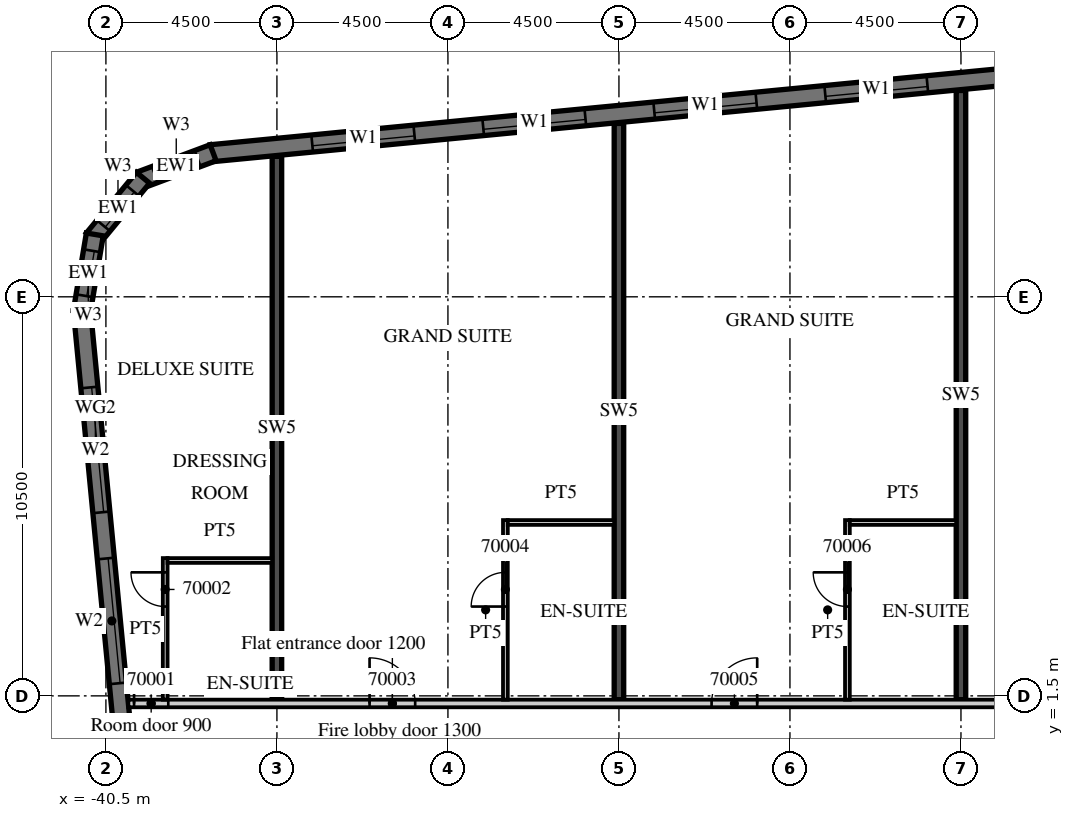
"""IFC4 building model, lengths in metres.
Left out: names, types, materials, properties, quantities, classifications, styles, units other than length and angle.
Written with IfcOpenShell. Run it as: python <this file> out.ifc"""

import sys

from ifc_helpers import new_model, si_unit, direction, frame, frame_2d, origin, place, context, subcontext, project, spatial, polyline, rectangle, outline, extrude, element, fill, save


model = new_model("IFC4")
c1 = context("Model", 3, precision=1e-05, world=origin(), true_north=direction((0.0, 1.0)))
c2 = subcontext(c1, "Body", "Model", "MODEL_VIEW")
j1 = project(units=[si_unit("LENGTHUNIT", "METRE"), si_unit("PLANEANGLEUNIT", "RADIAN")], contexts=[c1])
p1 = place(None, origin())
s1 = spatial("IfcSite", under=j1, at=p1, CompositionType="ELEMENT")
p2 = place(p1, origin())
s2 = spatial("IfcBuilding", under=s1, at=p2, CompositionType="ELEMENT")
p3 = place(p2, frame((0.0, 0.0, 281.7)))
s3 = spatial("IfcBuildingStorey", under=s2, at=p3, CompositionType="ELEMENT", Elevation=281.7)
p4 = place(p3, frame((-36.0, 1.4, 0.0), z_axis=(0.0, 0.0, 1.0), x_axis=(0.0, 1.0, 0.0)))
e1 = element("IfcWall", 1, at=p4, inside=s3, PredefinedType="SHEAR", context=c2, shape_type="SweptSolid", body=[
    extrude(rectangle(XDim=14.296, YDim=0.25, at=frame_2d((7.148, 0.0))), origin(), (0.0, 0.0, 1.0), 3.3),
])
p5 = place(p3, frame((-27.0, 1.4, 0.0), z_axis=(0.0, 0.0, 1.0), x_axis=(0.0, 1.0, 0.0)))
e2 = element("IfcWall", 2, at=p5, inside=s3, PredefinedType="SHEAR", context=c2, shape_type="SweptSolid", body=[
    extrude(rectangle(XDim=15.163, YDim=0.25, at=frame_2d((7.582, 0.0))), origin(), (0.0, 0.0, 1.0), 3.3),
])
p6 = place(p3, frame((-18.0, 1.4, 0.0), z_axis=(0.0, 0.0, 1.0), x_axis=(0.0, 1.0, 0.0)))
e3 = element("IfcWall", 3, at=p6, inside=s3, PredefinedType="SHEAR", context=c2, shape_type="SweptSolid", body=[
    extrude(rectangle(XDim=16.03, YDim=0.25, at=frame_2d((8.015, 0.0))), origin(), (0.0, 0.0, 1.0), 3.3),
])
p7 = place(p3, frame((-41.132, 11.658, 0.0), z_axis=(0.0, 0.0, 1.0), x_axis=(0.095847749461, -0.995396006082, 0.0)))
e4 = element("IfcWall", 4, at=p7, inside=s3, PredefinedType="SOLIDWALL", context=c2, shape_type="SweptSolid", body=[
    extrude(rectangle(XDim=32.0, YDim=0.45, at=frame_2d((16.0, 0.0))), origin(), (0.0, 0.0, 1.0), 3.02),
])
p8 = place(p7, frame((2.053, 0.0, 0.45)))
e5 = element("IfcOpeningElement", 5, at=p8, cuts=e4, PredefinedType="OPENING", context=c2, shape_type="SweptSolid", body=[
    extrude(rectangle(XDim=3.3, YDim=2.25, at=frame_2d((1.65, 1.125))), frame((0.0, 0.235, 0.0), z_axis=(0.0, -1.0, 0.0), x_axis=(1.0, 0.0, 0.0)), (0.0, 0.0, 1.0), 0.47),
])
p9 = place(p7, frame((6.574, 0.0, 0.45)))
e6 = element("IfcOpeningElement", 6, at=p9, cuts=e4, PredefinedType="OPENING", context=c2, shape_type="SweptSolid", body=[
    extrude(rectangle(XDim=3.3, YDim=2.25, at=frame_2d((1.65, 1.125))), frame((0.0, 0.235, 0.0), z_axis=(0.0, -1.0, 0.0), x_axis=(1.0, 0.0, 0.0)), (0.0, 0.0, 1.0), 0.47),
])
p10 = place(p3, frame((13.521, 20.713, 0.0), z_axis=(0.0, 0.0, 1.0), x_axis=(-0.995396277313, -0.095844932638, 0.0)))
e7 = element("IfcWall", 7, at=p10, inside=s3, PredefinedType="SOLIDWALL", context=c2, shape_type="SweptSolid", body=[
    extrude(rectangle(XDim=51.495, YDim=0.45, at=frame_2d((25.748, 0.0))), origin(), (0.0, 0.0, 1.0), 3.02),
])
p11 = place(p10, frame((0.91, 0.0, 0.45)))
e8 = element("IfcOpeningElement", 8, at=p11, cuts=e7, PredefinedType="OPENING", context=c2, shape_type="SweptSolid", body=[
    extrude(rectangle(XDim=2.7, YDim=2.25, at=frame_2d((1.35, 1.125))), frame((0.0, 0.235, 0.0), z_axis=(0.0, -1.0, 0.0), x_axis=(1.0, 0.0, 0.0)), (0.0, 0.0, 1.0), 0.47),
])
p12 = place(p10, frame((5.431, 0.0, 0.45)))
e9 = element("IfcOpeningElement", 9, at=p12, cuts=e7, PredefinedType="OPENING", context=c2, shape_type="SweptSolid", body=[
    extrude(rectangle(XDim=2.7, YDim=2.25, at=frame_2d((1.35, 1.125))), frame((0.0, 0.235, 0.0), z_axis=(0.0, -1.0, 0.0), x_axis=(1.0, 0.0, 0.0)), (0.0, 0.0, 1.0), 0.47),
])
p13 = place(p10, frame((9.952, 0.0, 0.45)))
e10 = element("IfcOpeningElement", 10, at=p13, cuts=e7, PredefinedType="OPENING", context=c2, shape_type="SweptSolid", body=[
    extrude(rectangle(XDim=2.7, YDim=2.25, at=frame_2d((1.35, 1.125))), frame((0.0, 0.235, 0.0), z_axis=(0.0, -1.0, 0.0), x_axis=(1.0, 0.0, 0.0)), (0.0, 0.0, 1.0), 0.47),
])
p14 = place(p10, frame((14.473, 0.0, 0.45)))
e11 = element("IfcOpeningElement", 11, at=p14, cuts=e7, PredefinedType="OPENING", context=c2, shape_type="SweptSolid", body=[
    extrude(rectangle(XDim=2.7, YDim=2.25, at=frame_2d((1.35, 1.125))), frame((0.0, 0.235, 0.0), z_axis=(0.0, -1.0, 0.0), x_axis=(1.0, 0.0, 0.0)), (0.0, 0.0, 1.0), 0.47),
])
p15 = place(p10, frame((18.994, 0.0, 0.45)))
e12 = element("IfcOpeningElement", 12, at=p15, cuts=e7, PredefinedType="OPENING", context=c2, shape_type="SweptSolid", body=[
    extrude(rectangle(XDim=2.7, YDim=2.25, at=frame_2d((1.35, 1.125))), frame((0.0, 0.235, 0.0), z_axis=(0.0, -1.0, 0.0), x_axis=(1.0, 0.0, 0.0)), (0.0, 0.0, 1.0), 0.47),
])
p16 = place(p10, frame((23.514, 0.0, 0.45)))
e13 = element("IfcOpeningElement", 13, at=p16, cuts=e7, PredefinedType="OPENING", context=c2, shape_type="SweptSolid", body=[
    extrude(rectangle(XDim=2.7, YDim=2.25, at=frame_2d((1.35, 1.125))), frame((0.0, 0.235, 0.0), z_axis=(0.0, -1.0, 0.0), x_axis=(1.0, 0.0, 0.0)), (0.0, 0.0, 1.0), 0.47),
])
p17 = place(p10, frame((28.035, 0.0, 0.45)))
e14 = element("IfcOpeningElement", 14, at=p17, cuts=e7, PredefinedType="OPENING", context=c2, shape_type="SweptSolid", body=[
    extrude(rectangle(XDim=2.7, YDim=2.25, at=frame_2d((1.35, 1.125))), frame((0.0, 0.235, 0.0), z_axis=(0.0, -1.0, 0.0), x_axis=(1.0, 0.0, 0.0)), (0.0, 0.0, 1.0), 0.47),
])
p18 = place(p10, frame((32.556, 0.0, 0.45)))
e15 = element("IfcOpeningElement", 15, at=p18, cuts=e7, PredefinedType="OPENING", context=c2, shape_type="SweptSolid", body=[
    extrude(rectangle(XDim=2.7, YDim=2.25, at=frame_2d((1.35, 1.125))), frame((0.0, 0.235, 0.0), z_axis=(0.0, -1.0, 0.0), x_axis=(1.0, 0.0, 0.0)), (0.0, 0.0, 1.0), 0.47),
])
p19 = place(p10, frame((37.077, 0.0, 0.45)))
e16 = element("IfcOpeningElement", 16, at=p19, cuts=e7, PredefinedType="OPENING", context=c2, shape_type="SweptSolid", body=[
    extrude(rectangle(XDim=2.7, YDim=2.25, at=frame_2d((1.35, 1.125))), frame((0.0, 0.235, 0.0), z_axis=(0.0, -1.0, 0.0), x_axis=(1.0, 0.0, 0.0)), (0.0, 0.0, 1.0), 0.47),
])
p20 = place(p10, frame((41.598, 0.0, 0.45)))
e17 = element("IfcOpeningElement", 17, at=p20, cuts=e7, PredefinedType="OPENING", context=c2, shape_type="SweptSolid", body=[
    extrude(rectangle(XDim=2.7, YDim=2.25, at=frame_2d((1.35, 1.125))), frame((0.0, 0.235, 0.0), z_axis=(0.0, -1.0, 0.0), x_axis=(1.0, 0.0, 0.0)), (0.0, 0.0, 1.0), 0.47),
])
p21 = place(p10, frame((46.118, 0.0, 0.45)))
e18 = element("IfcOpeningElement", 18, at=p21, cuts=e7, PredefinedType="OPENING", context=c2, shape_type="SweptSolid", body=[
    extrude(rectangle(XDim=2.7, YDim=2.25, at=frame_2d((1.35, 1.125))), frame((0.0, 0.235, 0.0), z_axis=(0.0, -1.0, 0.0), x_axis=(1.0, 0.0, 0.0)), (0.0, 0.0, 1.0), 0.47),
])
p22 = place(p3, frame((-37.679, 15.791, 0.0), z_axis=(0.0, 0.0, 1.0), x_axis=(-0.936677599948, -0.350192909346, 0.0)))
e19 = element("IfcWall", 19, at=p22, inside=s3, PredefinedType="SOLIDWALL", context=c2, shape_type="SweptSolid", body=[
    extrude(outline(polyline([(0.0, -0.225), (2.071, -0.225), (1.95, 0.225), (0.121, 0.225), (0.0, -0.225)])), origin(), (0.0, 0.0, 1.0), 3.02),
])
p23 = place(p22, frame((0.435, 0.0, 0.45)))
e20 = element("IfcOpeningElement", 20, at=p23, cuts=e19, PredefinedType="OPENING", context=c2, shape_type="SweptSolid", body=[
    extrude(rectangle(XDim=1.2, YDim=2.25, at=frame_2d((0.6, 1.125))), frame((0.0, 0.235, 0.0), z_axis=(0.0, -1.0, 0.0), x_axis=(1.0, 0.0, 0.0)), (0.0, 0.0, 1.0), 0.47),
])
p24 = place(p3, frame((-39.524, 15.133, 0.0), z_axis=(0.0, 0.0, 1.0), x_axis=(-0.636046112757, -0.771651049663, 0.0)))
e21 = element("IfcWall", 21, at=p24, inside=s3, PredefinedType="SOLIDWALL", context=c2, shape_type="SweptSolid", body=[
    extrude(outline(polyline([(0.0, -0.225), (2.071, -0.225), (1.95, 0.225), (0.121, 0.225), (0.0, -0.225)])), origin(), (0.0, 0.0, 1.0), 3.02),
])
p25 = place(p24, frame((0.435, 0.0, 0.45)))
e22 = element("IfcOpeningElement", 22, at=p25, cuts=e21, PredefinedType="OPENING", context=c2, shape_type="SweptSolid", body=[
    extrude(rectangle(XDim=1.2, YDim=2.25, at=frame_2d((0.6, 1.125))), frame((0.0, 0.235, 0.0), z_axis=(0.0, -1.0, 0.0), x_axis=(1.0, 0.0, 0.0)), (0.0, 0.0, 1.0), 0.47),
])
p26 = place(p3, frame((-40.792, 13.641, 0.0), z_axis=(0.0, 0.0, 1.0), x_axis=(-0.165068144653, -0.986282164302, 0.0)))
e23 = element("IfcWall", 23, at=p26, inside=s3, PredefinedType="SOLIDWALL", context=c2, shape_type="SweptSolid", body=[
    extrude(outline(polyline([(0.0, -0.225), (2.071, -0.225), (1.95, 0.225), (0.121, 0.225), (0.0, -0.225)])), origin(), (0.0, 0.0, 1.0), 3.02),
])
p27 = place(p26, frame((0.435, 0.0, 0.45)))
e24 = element("IfcOpeningElement", 24, at=p27, cuts=e23, PredefinedType="OPENING", context=c2, shape_type="SweptSolid", body=[
    extrude(rectangle(XDim=1.2, YDim=2.25, at=frame_2d((0.6, 1.125))), frame((0.0, 0.235, 0.0), z_axis=(0.0, -1.0, 0.0), x_axis=(1.0, 0.0, 0.0)), (0.0, 0.0, 1.0), 0.47),
])
p28 = place(p3, frame((-39.909, 1.3, 0.0), z_axis=(0.0, 0.0, 1.0), x_axis=(1.0, 0.0, 0.0)))
e25 = element("IfcWall", 25, at=p28, inside=s3, PredefinedType="PARTITIONING", context=c2, shape_type="SweptSolid", body=[
    extrude(rectangle(XDim=53.409, YDim=0.2, at=frame_2d((26.705, 0.0))), origin(), (0.0, 0.0, 1.0), 3.02),
])
p29 = place(p28, frame((0.15, 0.0, 0.0)))
e26 = element("IfcOpeningElement", 26, at=p29, cuts=e25, PredefinedType="OPENING", context=c2, shape_type="SweptSolid", body=[
    extrude(rectangle(XDim=0.9, YDim=2.1, at=frame_2d((0.45, 1.05))), frame((0.0, 0.11, 0.0), z_axis=(0.0, -1.0, 0.0), x_axis=(1.0, 0.0, 0.0)), (0.0, 0.0, 1.0), 0.22),
])
p30 = place(p28, frame((6.347, 0.0, 0.0)))
e27 = element("IfcOpeningElement", 27, at=p30, cuts=e25, PredefinedType="OPENING", context=c2, shape_type="SweptSolid", body=[
    extrude(rectangle(XDim=1.2, YDim=2.1, at=frame_2d((0.6, 1.05))), frame((0.0, 0.11, 0.0), z_axis=(0.0, -1.0, 0.0), x_axis=(1.0, 0.0, 0.0)), (0.0, 0.0, 1.0), 0.22),
])
p31 = place(p28, frame((15.347, 0.0, 0.0)))
e28 = element("IfcOpeningElement", 28, at=p31, cuts=e25, PredefinedType="OPENING", context=c2, shape_type="SweptSolid", body=[
    extrude(rectangle(XDim=1.2, YDim=2.1, at=frame_2d((0.6, 1.05))), frame((0.0, 0.11, 0.0), z_axis=(0.0, -1.0, 0.0), x_axis=(1.0, 0.0, 0.0)), (0.0, 0.0, 1.0), 0.22),
])
p32 = place(p28, frame((24.346, 0.0, 0.0)))
e29 = element("IfcOpeningElement", 29, at=p32, cuts=e25, PredefinedType="OPENING", context=c2, shape_type="SweptSolid", body=[
    extrude(rectangle(XDim=1.2, YDim=2.1, at=frame_2d((0.6, 1.05))), frame((0.0, 0.11, 0.0), z_axis=(0.0, -1.0, 0.0), x_axis=(1.0, 0.0, 0.0)), (0.0, 0.0, 1.0), 0.22),
])
p33 = place(p28, frame((33.346, 0.0, 0.0)))
e30 = element("IfcOpeningElement", 30, at=p33, cuts=e25, PredefinedType="OPENING", context=c2, shape_type="SweptSolid", body=[
    extrude(rectangle(XDim=1.2, YDim=2.1, at=frame_2d((0.6, 1.05))), frame((0.0, 0.11, 0.0), z_axis=(0.0, -1.0, 0.0), x_axis=(1.0, 0.0, 0.0)), (0.0, 0.0, 1.0), 0.22),
])
p34 = place(p28, frame((42.346, 0.0, 0.0)))
e31 = element("IfcOpeningElement", 31, at=p34, cuts=e25, PredefinedType="OPENING", context=c2, shape_type="SweptSolid", body=[
    extrude(rectangle(XDim=1.2, YDim=2.1, at=frame_2d((0.6, 1.05))), frame((0.0, 0.11, 0.0), z_axis=(0.0, -1.0, 0.0), x_axis=(1.0, 0.0, 0.0)), (0.0, 0.0, 1.0), 0.22),
])
p35 = place(p28, frame((51.834, 0.0, 0.0)))
e32 = element("IfcOpeningElement", 32, at=p35, cuts=e25, PredefinedType="OPENING", context=c2, shape_type="SweptSolid", body=[
    extrude(rectangle(XDim=1.0, YDim=2.1, at=frame_2d((0.5, 1.05))), frame((0.0, 0.11, 0.0), z_axis=(0.0, -1.0, 0.0), x_axis=(1.0, 0.0, 0.0)), (0.0, 0.0, 1.0), 0.22),
])
p36 = place(p3, frame((-38.94, 1.4, 0.0), z_axis=(0.0, 0.0, 1.0), x_axis=(0.0, 1.0, 0.0)))
e33 = element("IfcWall", 33, at=p36, inside=s3, PredefinedType="PARTITIONING", context=c2, shape_type="SweptSolid", body=[
    extrude(rectangle(XDim=3.725, YDim=0.125, at=frame_2d((1.863, 0.0))), origin(), (0.0, 0.0, 1.0), 3.02),
])
p37 = place(p36, frame((2.45, 0.0, 0.0)))
e34 = element("IfcOpeningElement", 34, at=p37, cuts=e33, PredefinedType="OPENING", context=c2, shape_type="SweptSolid", body=[
    extrude(rectangle(XDim=0.9, YDim=2.1, at=frame_2d((0.45, 1.05))), frame((0.0, 0.073, 0.0), z_axis=(0.0, -1.0, 0.0), x_axis=(1.0, 0.0, 0.0)), (0.0, 0.0, 1.0), 0.145),
])
p38 = place(p3, frame((-38.878, 5.062, 0.0), z_axis=(0.0, 0.0, 1.0), x_axis=(1.0, 0.0, 0.0)))
e35 = element("IfcWall", 35, at=p38, inside=s3, PredefinedType="PARTITIONING", context=c2, shape_type="SweptSolid", body=[
    extrude(rectangle(XDim=2.753, YDim=0.125, at=frame_2d((1.376, 0.0))), origin(), (0.0, 0.0, 1.0), 3.02),
])
p39 = place(p3, frame((-29.988, 1.4, 0.0), z_axis=(0.0, 0.0, 1.0), x_axis=(0.0, 1.0, 0.0)))
e36 = element("IfcWall", 36, at=p39, inside=s3, PredefinedType="PARTITIONING", context=c2, shape_type="SweptSolid", body=[
    extrude(rectangle(XDim=4.725, YDim=0.125, at=frame_2d((2.363, 0.0))), origin(), (0.0, 0.0, 1.0), 3.02),
])
p40 = place(p39, frame((2.45, 0.0, 0.0)))
e37 = element("IfcOpeningElement", 37, at=p40, cuts=e36, PredefinedType="OPENING", context=c2, shape_type="SweptSolid", body=[
    extrude(rectangle(XDim=0.9, YDim=2.1, at=frame_2d((0.45, 1.05))), frame((0.0, 0.073, 0.0), z_axis=(0.0, -1.0, 0.0), x_axis=(1.0, 0.0, 0.0)), (0.0, 0.0, 1.0), 0.145),
])
p41 = place(p3, frame((-29.925, 6.062, 0.0), z_axis=(0.0, 0.0, 1.0), x_axis=(1.0, 0.0, 0.0)))
e38 = element("IfcWall", 38, at=p41, inside=s3, PredefinedType="PARTITIONING", context=c2, shape_type="SweptSolid", body=[
    extrude(rectangle(XDim=2.8, YDim=0.125, at=frame_2d((1.4, 0.0))), origin(), (0.0, 0.0, 1.0), 3.02),
])
p42 = place(p3, frame((-20.988, 1.4, 0.0), z_axis=(0.0, 0.0, 1.0), x_axis=(0.0, 1.0, 0.0)))
e39 = element("IfcWall", 39, at=p42, inside=s3, PredefinedType="PARTITIONING", context=c2, shape_type="SweptSolid", body=[
    extrude(rectangle(XDim=4.725, YDim=0.125, at=frame_2d((2.363, 0.0))), origin(), (0.0, 0.0, 1.0), 3.02),
])
p43 = place(p42, frame((2.45, 0.0, 0.0)))
e40 = element("IfcOpeningElement", 40, at=p43, cuts=e39, PredefinedType="OPENING", context=c2, shape_type="SweptSolid", body=[
    extrude(rectangle(XDim=0.9, YDim=2.1, at=frame_2d((0.45, 1.05))), frame((0.0, 0.073, 0.0), z_axis=(0.0, -1.0, 0.0), x_axis=(1.0, 0.0, 0.0)), (0.0, 0.0, 1.0), 0.145),
])
p44 = place(p3, frame((-20.925, 6.062, 0.0), z_axis=(0.0, 0.0, 1.0), x_axis=(1.0, 0.0, 0.0)))
e41 = element("IfcWall", 41, at=p44, inside=s3, PredefinedType="PARTITIONING", context=c2, shape_type="SweptSolid", body=[
    extrude(rectangle(XDim=2.8, YDim=0.125, at=frame_2d((1.4, 0.0))), origin(), (0.0, 0.0, 1.0), 3.02),
])
p45 = place(p8, origin())
e42 = element("IfcWindow", 42, at=p45, inside=s3, PartitioningType="SINGLE_PANEL", PredefinedType="WINDOW", context=c2, shape_type="SweptSolid", body=[
    extrude(rectangle(XDim=3.3, YDim=2.25, at=frame_2d((1.65, 1.125))), frame((0.0, 0.09, 0.0), z_axis=(0.0, -1.0, 0.0), x_axis=(1.0, 0.0, 0.0)), (0.0, 0.0, 1.0), 0.06),
])
fill(e5, e42)
p46 = place(p9, origin())
e43 = element("IfcWindow", 43, at=p46, inside=s3, PartitioningType="SINGLE_PANEL", PredefinedType="WINDOW", context=c2, shape_type="SweptSolid", body=[
    extrude(rectangle(XDim=3.3, YDim=2.25, at=frame_2d((1.65, 1.125))), frame((0.0, 0.09, 0.0), z_axis=(0.0, -1.0, 0.0), x_axis=(1.0, 0.0, 0.0)), (0.0, 0.0, 1.0), 0.06),
])
fill(e6, e43)
p47 = place(p18, origin())
e44 = element("IfcWindow", 44, at=p47, inside=s3, PartitioningType="SINGLE_PANEL", PredefinedType="WINDOW", context=c2, shape_type="SweptSolid", body=[
    extrude(rectangle(XDim=2.7, YDim=2.25, at=frame_2d((1.35, 1.125))), frame((0.0, 0.09, 0.0), z_axis=(0.0, -1.0, 0.0), x_axis=(1.0, 0.0, 0.0)), (0.0, 0.0, 1.0), 0.06),
])
fill(e15, e44)
p48 = place(p19, origin())
e45 = element("IfcWindow", 45, at=p48, inside=s3, PartitioningType="SINGLE_PANEL", PredefinedType="WINDOW", context=c2, shape_type="SweptSolid", body=[
    extrude(rectangle(XDim=2.7, YDim=2.25, at=frame_2d((1.35, 1.125))), frame((0.0, 0.09, 0.0), z_axis=(0.0, -1.0, 0.0), x_axis=(1.0, 0.0, 0.0)), (0.0, 0.0, 1.0), 0.06),
])
fill(e16, e45)
p49 = place(p20, origin())
e46 = element("IfcWindow", 46, at=p49, inside=s3, PartitioningType="SINGLE_PANEL", PredefinedType="WINDOW", context=c2, shape_type="SweptSolid", body=[
    extrude(rectangle(XDim=2.7, YDim=2.25, at=frame_2d((1.35, 1.125))), frame((0.0, 0.09, 0.0), z_axis=(0.0, -1.0, 0.0), x_axis=(1.0, 0.0, 0.0)), (0.0, 0.0, 1.0), 0.06),
])
fill(e17, e46)
p50 = place(p21, origin())
e47 = element("IfcWindow", 47, at=p50, inside=s3, PartitioningType="SINGLE_PANEL", PredefinedType="WINDOW", context=c2, shape_type="SweptSolid", body=[
    extrude(rectangle(XDim=2.7, YDim=2.25, at=frame_2d((1.35, 1.125))), frame((0.0, 0.09, 0.0), z_axis=(0.0, -1.0, 0.0), x_axis=(1.0, 0.0, 0.0)), (0.0, 0.0, 1.0), 0.06),
])
fill(e18, e47)
p51 = place(p23, origin())
e48 = element("IfcWindow", 48, at=p51, inside=s3, PartitioningType="SINGLE_PANEL", PredefinedType="WINDOW", context=c2, shape_type="SweptSolid", body=[
    extrude(rectangle(XDim=1.2, YDim=2.25, at=frame_2d((0.6, 1.125))), frame((0.0, 0.09, 0.0), z_axis=(0.0, -1.0, 0.0), x_axis=(1.0, 0.0, 0.0)), (0.0, 0.0, 1.0), 0.06),
])
fill(e20, e48)
p52 = place(p25, origin())
e49 = element("IfcWindow", 49, at=p52, inside=s3, PartitioningType="SINGLE_PANEL", PredefinedType="WINDOW", context=c2, shape_type="SweptSolid", body=[
    extrude(rectangle(XDim=1.2, YDim=2.25, at=frame_2d((0.6, 1.125))), frame((0.0, 0.09, 0.0), z_axis=(0.0, -1.0, 0.0), x_axis=(1.0, 0.0, 0.0)), (0.0, 0.0, 1.0), 0.06),
])
fill(e22, e49)
p53 = place(p27, origin())
e50 = element("IfcWindow", 50, at=p53, inside=s3, PartitioningType="SINGLE_PANEL", PredefinedType="WINDOW", context=c2, shape_type="SweptSolid", body=[
    extrude(rectangle(XDim=1.2, YDim=2.25, at=frame_2d((0.6, 1.125))), frame((0.0, 0.09, 0.0), z_axis=(0.0, -1.0, 0.0), x_axis=(1.0, 0.0, 0.0)), (0.0, 0.0, 1.0), 0.06),
])
fill(e24, e50)
p54 = place(p29, origin())
e51 = element("IfcDoor", 51, at=p54, inside=s3, OperationType="SINGLE_SWING_LEFT", PredefinedType="DOOR", context=c2, shape_type="SweptSolid", body=[
    extrude(rectangle(XDim=0.9, YDim=2.1, at=frame_2d((0.45, 1.05))), frame((0.0, 0.025, 0.0), z_axis=(0.0, -1.0, 0.0), x_axis=(1.0, 0.0, 0.0)), (0.0, 0.0, 1.0), 0.05),
])
fill(e26, e51)
p55 = place(p37, origin())
e52 = element("IfcDoor", 52, at=p55, inside=s3, OperationType="SINGLE_SWING_RIGHT", PredefinedType="DOOR", context=c2, shape_type="SweptSolid", body=[
    extrude(rectangle(XDim=0.9, YDim=2.1, at=frame_2d((0.45, 1.05))), frame((0.0, 0.025, 0.0), z_axis=(0.0, -1.0, 0.0), x_axis=(1.0, 0.0, 0.0)), (0.0, 0.0, 1.0), 0.05),
])
fill(e34, e52)
p56 = place(p30, origin())
e53 = element("IfcDoor", 53, at=p56, inside=s3, OperationType="SINGLE_SWING_LEFT", PredefinedType="DOOR", context=c2, shape_type="SweptSolid", body=[
    extrude(rectangle(XDim=1.2, YDim=2.1, at=frame_2d((0.6, 1.05))), frame((0.0, 0.025, 0.0), z_axis=(0.0, -1.0, 0.0), x_axis=(1.0, 0.0, 0.0)), (0.0, 0.0, 1.0), 0.05),
])
fill(e27, e53)
p57 = place(p40, origin())
e54 = element("IfcDoor", 54, at=p57, inside=s3, OperationType="SINGLE_SWING_LEFT", PredefinedType="DOOR", context=c2, shape_type="SweptSolid", body=[
    extrude(rectangle(XDim=0.9, YDim=2.1, at=frame_2d((0.45, 1.05))), frame((0.0, 0.025, 0.0), z_axis=(0.0, -1.0, 0.0), x_axis=(1.0, 0.0, 0.0)), (0.0, 0.0, 1.0), 0.05),
])
fill(e37, e54)
p58 = place(p31, origin())
e55 = element("IfcDoor", 55, at=p58, inside=s3, OperationType="SINGLE_SWING_RIGHT", PredefinedType="DOOR", context=c2, shape_type="SweptSolid", body=[
    extrude(rectangle(XDim=1.2, YDim=2.1, at=frame_2d((0.6, 1.05))), frame((0.0, 0.025, 0.0), z_axis=(0.0, -1.0, 0.0), x_axis=(1.0, 0.0, 0.0)), (0.0, 0.0, 1.0), 0.05),
])
fill(e28, e55)
p59 = place(p43, origin())
e56 = element("IfcDoor", 56, at=p59, inside=s3, OperationType="SINGLE_SWING_RIGHT", PredefinedType="DOOR", context=c2, shape_type="SweptSolid", body=[
    extrude(rectangle(XDim=0.9, YDim=2.1, at=frame_2d((0.45, 1.05))), frame((0.0, 0.025, 0.0), z_axis=(0.0, -1.0, 0.0), x_axis=(1.0, 0.0, 0.0)), (0.0, 0.0, 1.0), 0.05),
])
fill(e40, e56)
save(model, sys.argv[1])
